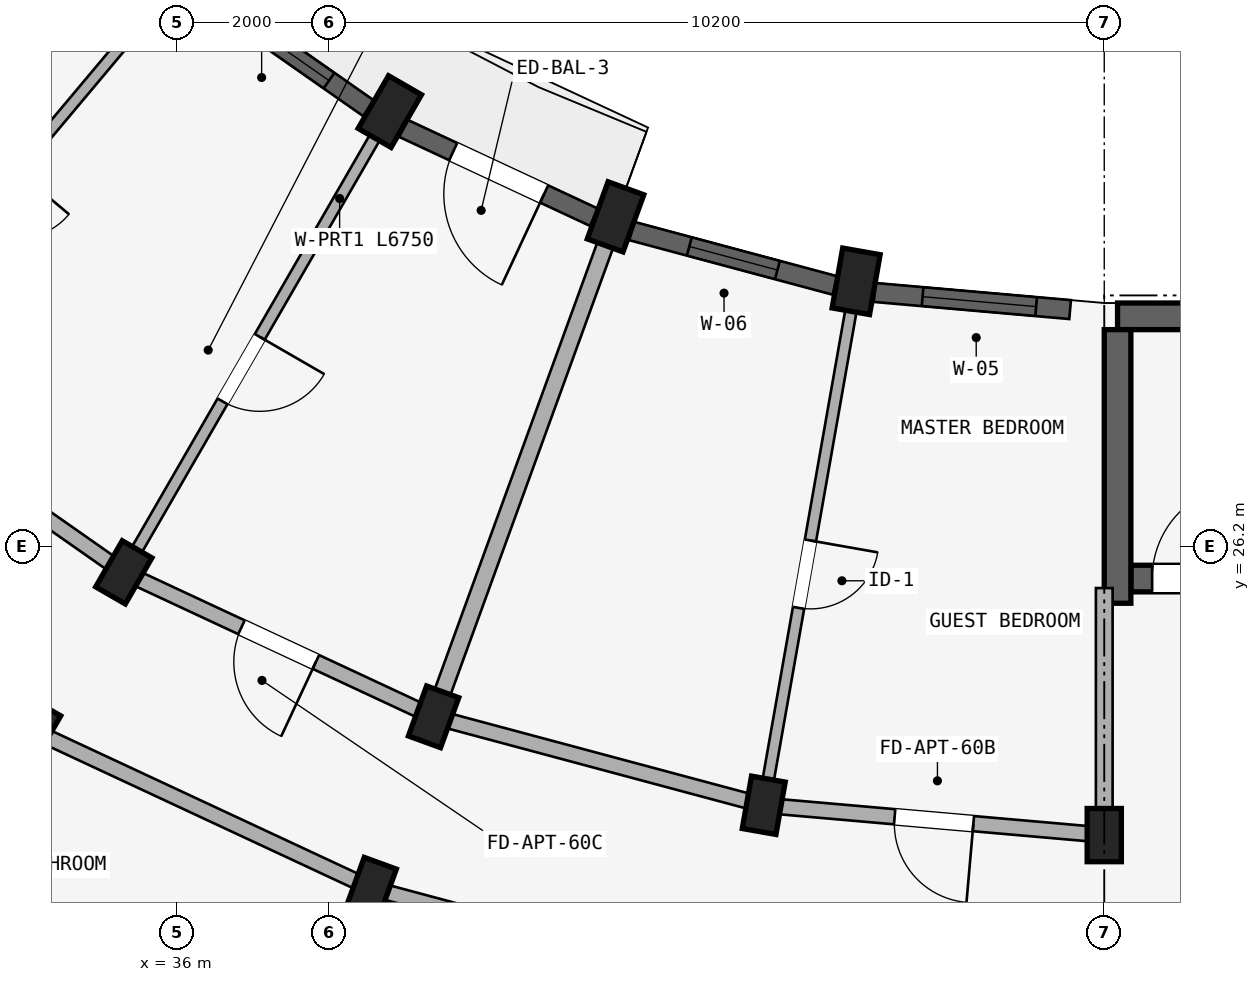
"""IFC4 building model, lengths in metres.
Left out: names, types, materials, properties, quantities, classifications, styles, units other than length and angle.
Written with IfcOpenShell. Run it as: python <this file> out.ifc"""

import sys

from ifc_helpers import new_model, si_unit, direction, frame, frame_2d, origin, origin_2d, place, context, subcontext, project, spatial, rectangle, extrude, element, fill, save


model = new_model("IFC4")
c1 = context("Model", 3, precision=1e-05, world=origin(), true_north=direction((0.0, 1.0)))
c2 = subcontext(c1, "Body", "Model", "MODEL_VIEW")
j1 = project(units=[si_unit("LENGTHUNIT", "METRE"), si_unit("PLANEANGLEUNIT", "RADIAN")], contexts=[c1])
p1 = place(None, origin())
s1 = spatial("IfcSite", under=j1, at=p1, CompositionType="ELEMENT")
p2 = place(p1, origin())
s2 = spatial("IfcBuilding", under=s1, at=p2, CompositionType="ELEMENT")
p3 = place(p2, frame((0.0, 0.0, 24.45)))
s3 = spatial("IfcBuildingStorey", under=s2, at=p3, CompositionType="ELEMENT", Elevation=24.45)
p4 = place(p3, frame((48.375, 29.225, 0.0), z_axis=(0.0, 0.0, 1.0), x_axis=(1.0, 0.0, 0.0)))
e1 = element("IfcWall", 1, at=p4, inside=s3, PredefinedType="SHEAR", context=c2, shape_type="SweptSolid", body=[
    extrude(rectangle(XDim=8.25, YDim=0.35, at=frame_2d((4.125, 0.0))), origin(), (0.0, 0.0, 1.0), 2.93),
])
p5 = place(p3, frame((48.55, 25.775, 0.0), z_axis=(0.0, 0.0, 1.0), x_axis=(1.0, 0.0, 0.0)))
e2 = element("IfcWall", 2, at=p5, inside=s3, PredefinedType="SHEAR", context=c2, shape_type="SweptSolid", body=[
    extrude(rectangle(XDim=7.9, YDim=0.35, at=frame_2d((3.95, 0.0))), origin(), (0.0, 0.0, 1.0), 2.93),
])
p6 = place(p5, frame((0.28, 0.0, 0.0)))
e3 = element("IfcOpeningElement", 3, at=p6, cuts=e2, PredefinedType="OPENING", context=c2, shape_type="SweptSolid", body=[
    extrude(rectangle(XDim=1.24, YDim=2.15, at=frame_2d((0.62, 1.075))), frame((0.0, 0.185, 0.0), z_axis=(0.0, -1.0, 0.0), x_axis=(1.0, 0.0, 0.0)), (0.0, 0.0, 1.0), 0.37),
])
p7 = place(p3, frame((48.375, 29.05, 0.0), z_axis=(0.0, 0.0, 1.0), x_axis=(0.0, -1.0, 0.0)))
e4 = element("IfcWall", 4, at=p7, inside=s3, PredefinedType="SHEAR", context=c2, shape_type="SweptSolid", body=[
    extrude(rectangle(XDim=3.6, YDim=0.35, at=frame_2d((1.8, 0.0))), origin(), (0.0, 0.0, 1.0), 2.93),
])
p8 = place(p3, frame((48.2, 22.4, 0.0), z_axis=(0.0, 0.0, 1.0), x_axis=(1.0, 0.0, 0.0)))
e5 = element("IfcColumn", 5, at=p8, inside=s3, PredefinedType="COLUMN", context=c2, shape_type="SweptSolid", body=[
    extrude(rectangle(XDim=0.45, YDim=0.7, at=origin_2d()), origin(), (0.0, 0.0, 1.0), 2.93),
])
p9 = place(p3, frame((44.935, 29.686, 0.0), z_axis=(0.0, 0.0, 1.0), x_axis=(-0.984807753012, 0.173648177667, 0.0)))
e6 = element("IfcColumn", 6, at=p9, inside=s3, PredefinedType="COLUMN", context=c2, shape_type="SweptSolid", body=[
    extrude(rectangle(XDim=0.5, YDim=0.8, at=origin_2d()), origin(), (0.0, 0.0, 1.0), 2.93),
])
p10 = place(p3, frame((43.72, 22.792, 0.0), z_axis=(0.0, 0.0, 1.0), x_axis=(-0.984807753012, 0.173648177667, 0.0)))
e7 = element("IfcColumn", 7, at=p10, inside=s3, PredefinedType="COLUMN", context=c2, shape_type="SweptSolid", body=[
    extrude(rectangle(XDim=0.45, YDim=0.7, at=origin_2d()), origin(), (0.0, 0.0, 1.0), 2.93),
])
p11 = place(p3, frame((41.77, 30.534, 0.0), z_axis=(0.0, 0.0, 1.0), x_axis=(-0.939692620786, 0.342020143326, 0.0)))
e8 = element("IfcColumn", 8, at=p11, inside=s3, PredefinedType="COLUMN", context=c2, shape_type="SweptSolid", body=[
    extrude(rectangle(XDim=0.5, YDim=0.8, at=origin_2d()), origin(), (0.0, 0.0, 1.0), 2.93),
])
for number, where, z_axis, x_axis in (
    (9, (39.376, 23.956, 0.0), (0.0, 0.0, 1.0), (-0.94, 0.342, 0.0)),
    (10, (38.555, 21.701, 0.0), (0.0, 0.0, 1.0), (-0.94, 0.342, 0.0)),
):
    element("IfcColumn", number, at=place(p3, frame(where, z_axis=z_axis, x_axis=x_axis)), inside=s3, PredefinedType="COLUMN", context=c2, shape_type="SweptSolid", body=[
        extrude(rectangle(XDim=0.45, YDim=0.7, at=origin_2d()), origin(), (0.0, 0.0, 1.0), 2.93),
    ])
p12 = place(p3, frame((38.8, 31.919, 0.0), z_axis=(0.0, 0.0, 1.0), x_axis=(-0.866025403784, 0.5, 0.0)))
e11 = element("IfcColumn", 11, at=p12, inside=s3, PredefinedType="COLUMN", context=c2, shape_type="SweptSolid", body=[
    extrude(rectangle(XDim=0.5, YDim=0.8, at=origin_2d()), origin(), (0.0, 0.0, 1.0), 2.93),
])
for number, where, z_axis, x_axis in (
    (12, (35.3, 25.856, 0.0), (0.0, 0.0, 1.0), (-0.866, 0.5, 0.0)),
    (13, (34.1, 23.778, 0.0), (0.0, 0.0, 1.0), (-0.866, 0.5, 0.0)),
):
    element("IfcColumn", number, at=place(p3, frame(where, z_axis=z_axis, x_axis=x_axis)), inside=s3, PredefinedType="COLUMN", context=c2, shape_type="SweptSolid", body=[
        extrude(rectangle(XDim=0.45, YDim=0.7, at=origin_2d()), origin(), (0.0, 0.0, 1.0), 2.93),
    ])
p13 = place(p3, frame((48.2, 22.4, 0.0), z_axis=(0.0, 0.0, 1.0), x_axis=(-0.996191949488, 0.087187153726, 0.0)))
e14 = element("IfcWall", 14, at=p13, inside=s3, PredefinedType="STANDARD", context=c2, shape_type="SweptSolid", body=[
    extrude(rectangle(XDim=4.497, YDim=0.2, at=frame_2d((2.249, 0.0))), origin(), (0.0, 0.0, 1.0), 2.372),
])
p14 = place(p13, frame((1.729, 0.0, 0.0)))
e15 = element("IfcOpeningElement", 15, at=p14, cuts=e14, PredefinedType="OPENING", context=c2, shape_type="SweptSolid", body=[
    extrude(rectangle(XDim=1.04, YDim=2.15, at=frame_2d((0.52, 1.075))), frame((0.0, 0.11, 0.0), z_axis=(0.0, -1.0, 0.0), x_axis=(1.0, 0.0, 0.0)), (0.0, 0.0, 1.0), 0.22),
])
p15 = place(p3, frame((43.72, 22.792, 0.0), z_axis=(0.0, 0.0, 1.0), x_axis=(-0.965934240054, 0.258787642463, 0.0)))
e16 = element("IfcWall", 16, at=p15, inside=s3, PredefinedType="STANDARD", context=c2, shape_type="SweptSolid", body=[
    extrude(rectangle(XDim=4.497, YDim=0.2, at=frame_2d((2.249, 0.0))), origin(), (0.0, 0.0, 1.0), 2.372),
])
p16 = place(p3, frame((43.303, 20.428, 0.0), z_axis=(0.0, 0.0, 1.0), x_axis=(-0.965930095386, 0.258803112091, 0.0)))
e17 = element("IfcWall", 17, at=p16, inside=s3, PredefinedType="STANDARD", context=c2, shape_type="SweptSolid", body=[
    extrude(rectangle(XDim=4.916, YDim=0.2, at=frame_2d((2.458, 0.0))), origin(), (0.0, 0.0, 1.0), 2.372),
])
p17 = place(p3, frame((39.376, 23.956, 0.0), z_axis=(0.0, 0.0, 1.0), x_axis=(-0.906307919131, 0.422617978463, 0.0)))
e18 = element("IfcWall", 18, at=p17, inside=s3, PredefinedType="STANDARD", context=c2, shape_type="SweptSolid", body=[
    extrude(rectangle(XDim=4.497, YDim=0.2, at=frame_2d((2.249, 0.0))), origin(), (0.0, 0.0, 1.0), 2.372),
])
p18 = place(p17, frame((1.709, 0.0, 0.0)))
e19 = element("IfcOpeningElement", 19, at=p18, cuts=e18, PredefinedType="OPENING", context=c2, shape_type="SweptSolid", body=[
    extrude(rectangle(XDim=1.08, YDim=2.15, at=frame_2d((0.54, 1.075))), frame((0.0, 0.11, 0.0), z_axis=(0.0, -1.0, 0.0), x_axis=(1.0, 0.0, 0.0)), (0.0, 0.0, 1.0), 0.22),
])
p19 = place(p3, frame((38.555, 21.701, 0.0), z_axis=(0.0, 0.0, 1.0), x_axis=(-0.906302381024, 0.422629854778, 0.0)))
e20 = element("IfcWall", 20, at=p19, inside=s3, PredefinedType="STANDARD", context=c2, shape_type="SweptSolid", body=[
    extrude(rectangle(XDim=4.915, YDim=0.2, at=frame_2d((2.458, 0.0))), origin(), (0.0, 0.0, 1.0), 2.372),
])
p20 = place(p3, frame((35.3, 25.856, 0.0), z_axis=(0.0, 0.0, 1.0), x_axis=(-0.819155404658, 0.573571637217, 0.0)))
e21 = element("IfcWall", 21, at=p20, inside=s3, PredefinedType="STANDARD", context=c2, shape_type="SweptSolid", body=[
    extrude(rectangle(XDim=4.497, YDim=0.2, at=frame_2d((2.249, 0.0))), origin(), (0.0, 0.0, 1.0), 2.372),
])
p21 = place(p3, frame((48.2, 25.65, 0.0), z_axis=(0.0, 0.0, 1.0), x_axis=(0.0, -1.0, 0.0)))
e22 = element("IfcWall", 22, at=p21, inside=s3, PredefinedType="STANDARD", context=c2, shape_type="SweptSolid", body=[
    extrude(rectangle(XDim=3.2, YDim=0.22, at=frame_2d((1.6, 0.0))), origin(), (0.0, 0.0, 1.0), 2.372),
])
p22 = place(p3, frame((44.901, 29.489, 0.0), z_axis=(0.0, 0.0, 1.0), x_axis=(-0.173647089161, -0.984807944945, 0.0)))
e23 = element("IfcWall", 23, at=p22, inside=s3, PredefinedType="PARTITIONING", context=c2, shape_type="SweptSolid", body=[
    extrude(rectangle(XDim=6.75, YDim=0.15, at=frame_2d((3.375, 0.0))), origin(), (0.0, 0.0, 1.0), 2.372),
])
p23 = place(p22, frame((3.262, 0.0, 0.0)))
e24 = element("IfcOpeningElement", 24, at=p23, cuts=e23, PredefinedType="OPENING", context=c2, shape_type="SweptSolid", body=[
    extrude(rectangle(XDim=0.9, YDim=2.1, at=frame_2d((0.45, 1.05))), frame((0.0, 0.085, 0.0), z_axis=(0.0, -1.0, 0.0), x_axis=(1.0, 0.0, 0.0)), (0.0, 0.0, 1.0), 0.17),
])
p24 = place(p3, frame((41.702, 30.346, 0.0), z_axis=(0.0, 0.0, 1.0), x_axis=(-0.342010221662, -0.939696231917, 0.0)))
e25 = element("IfcWall", 25, at=p24, inside=s3, PredefinedType="STANDARD", context=c2, shape_type="SweptSolid", body=[
    extrude(rectangle(XDim=6.75, YDim=0.22, at=frame_2d((3.375, 0.0))), origin(), (0.0, 0.0, 1.0), 2.372),
])
p25 = place(p3, frame((38.521, 21.607, 0.0), z_axis=(0.0, 0.0, 1.0), x_axis=(-0.342005081534, -0.939698102693, 0.0)))
e26 = element("IfcWall", 26, at=p25, inside=s3, PredefinedType="PARTITIONING", context=c2, shape_type="SweptSolid", body=[
    extrude(rectangle(XDim=11.82, YDim=0.15, at=frame_2d((5.91, 0.0))), origin(), (0.0, 0.0, 1.0), 2.372),
])
p26 = place(p25, frame((7.5, 0.0, 0.0)))
e27 = element("IfcOpeningElement", 27, at=p26, cuts=e26, PredefinedType="OPENING", context=c2, shape_type="SweptSolid", body=[
    extrude(rectangle(XDim=0.8, YDim=2.1, at=frame_2d((0.4, 1.05))), frame((0.0, 0.085, 0.0), z_axis=(0.0, -1.0, 0.0), x_axis=(1.0, 0.0, 0.0)), (0.0, 0.0, 1.0), 0.17),
])
p27 = place(p3, frame((38.7, 31.746, 0.0), z_axis=(0.0, 0.0, 1.0), x_axis=(-0.499997969693, -0.866026575979, 0.0)))
e28 = element("IfcWall", 28, at=p27, inside=s3, PredefinedType="PARTITIONING", context=c2, shape_type="SweptSolid", body=[
    extrude(rectangle(XDim=6.75, YDim=0.15, at=frame_2d((3.375, 0.0))), origin(), (0.0, 0.0, 1.0), 2.372),
])
p28 = place(p27, frame((3.222, 0.0, 0.0)))
e29 = element("IfcOpeningElement", 29, at=p28, cuts=e28, PredefinedType="OPENING", context=c2, shape_type="SweptSolid", body=[
    extrude(rectangle(XDim=0.98, YDim=2.12, at=frame_2d((0.49, 1.06))), frame((0.0, 0.085, 0.0), z_axis=(0.0, -1.0, 0.0), x_axis=(1.0, 0.0, 0.0)), (0.0, 0.0, 1.0), 0.17),
])
p29 = place(p3, frame((35.987, 33.645, 0.0), z_axis=(0.0, 0.0, 1.0), x_axis=(-0.642784846501, -0.766046761698, 0.0)))
e30 = element("IfcWall", 30, at=p29, inside=s3, PredefinedType="PARTITIONING", context=c2, shape_type="SweptSolid", body=[
    extrude(rectangle(XDim=6.75, YDim=0.15, at=frame_2d((3.375, 0.0))), origin(), (0.0, 0.0, 1.0), 2.372),
])
p30 = place(p29, frame((3.262, 0.0, 0.0)))
e31 = element("IfcOpeningElement", 31, at=p30, cuts=e30, PredefinedType="OPENING", context=c2, shape_type="SweptSolid", body=[
    extrude(rectangle(XDim=0.9, YDim=2.1, at=frame_2d((0.45, 1.05))), frame((0.0, 0.085, 0.0), z_axis=(0.0, -1.0, 0.0), x_axis=(1.0, 0.0, 0.0)), (0.0, 0.0, 1.0), 0.17),
])
p31 = place(p3, frame((47.751, 29.314, 0.0), z_axis=(0.0, 0.0, 1.0), x_axis=(-0.996188278786, 0.087229084652, 0.0)))
e32 = element("IfcWall", 32, at=p31, inside=s3, PredefinedType="STANDARD", context=c2, shape_type="SweptSolid", body=[
    extrude(rectangle(XDim=2.583, YDim=0.25, at=frame_2d((1.292, 0.0))), origin(), (0.0, 0.0, 1.0), 2.422),
])
p32 = place(p31, frame((0.448, 0.0, 0.572)))
e33 = element("IfcOpeningElement", 33, at=p32, cuts=e32, PredefinedType="OPENING", context=c2, shape_type="SweptSolid", body=[
    extrude(rectangle(XDim=1.5, YDim=1.65, at=frame_2d((0.75, 0.825))), frame((0.0, 0.135, 0.0), z_axis=(0.0, -1.0, 0.0), x_axis=(1.0, 0.0, 0.0)), (0.0, 0.0, 1.0), 0.27),
])
p33 = place(p3, frame((44.658, 29.631, 0.0), z_axis=(0.0, 0.0, 1.0), x_axis=(-0.965935855992, 0.25878161084, 0.0)))
e34 = element("IfcWall", 34, at=p33, inside=s3, PredefinedType="STANDARD", context=c2, shape_type="SweptSolid", body=[
    extrude(rectangle(XDim=2.77, YDim=0.25, at=frame_2d((1.385, 0.0))), origin(), (0.0, 0.0, 1.0), 2.422),
])
p34 = place(p33, frame((0.785, 0.0, 0.722)))
e35 = element("IfcOpeningElement", 35, at=p34, cuts=e34, PredefinedType="OPENING", context=c2, shape_type="SweptSolid", body=[
    extrude(rectangle(XDim=1.2, YDim=1.5, at=frame_2d((0.6, 0.75))), frame((0.0, 0.135, 0.0), z_axis=(0.0, -1.0, 0.0), x_axis=(1.0, 0.0, 0.0)), (0.0, 0.0, 1.0), 0.27),
])
p35 = place(p3, frame((41.487, 30.528, 0.0), z_axis=(0.0, 0.0, 1.0), x_axis=(-0.906293449611, 0.422649007088, 0.0)))
e36 = element("IfcWall", 36, at=p35, inside=s3, PredefinedType="STANDARD", context=c2, shape_type="SweptSolid", body=[
    extrude(rectangle(XDim=2.77, YDim=0.25, at=frame_2d((1.385, 0.0))), origin(), (0.0, 0.0, 1.0), 2.422),
])
p36 = place(p35, frame((0.725, 0.0, 0.0)))
e37 = element("IfcOpeningElement", 37, at=p36, cuts=e36, PredefinedType="OPENING", context=c2, shape_type="SweptSolid", body=[
    extrude(rectangle(XDim=1.32, YDim=2.15, at=frame_2d((0.66, 1.075))), frame((0.0, 0.135, 0.0), z_axis=(0.0, -1.0, 0.0), x_axis=(1.0, 0.0, 0.0)), (0.0, 0.0, 1.0), 0.27),
])
p37 = place(p3, frame((38.521, 31.962, 0.0), z_axis=(0.0, 0.0, 1.0), x_axis=(-0.819111815273, 0.573633885053, 0.0)))
e38 = element("IfcWall", 38, at=p37, inside=s3, PredefinedType="STANDARD", context=c2, shape_type="SweptSolid", body=[
    extrude(rectangle(XDim=2.77, YDim=0.25, at=frame_2d((1.385, 0.0))), origin(), (0.0, 0.0, 1.0), 2.422),
])
p38 = place(p37, frame((0.635, 0.0, 0.572)))
e39 = element("IfcOpeningElement", 39, at=p38, cuts=e38, PredefinedType="OPENING", context=c2, shape_type="SweptSolid", body=[
    extrude(rectangle(XDim=1.5, YDim=1.65, at=frame_2d((0.75, 0.825))), frame((0.0, 0.135, 0.0), z_axis=(0.0, -1.0, 0.0), x_axis=(1.0, 0.0, 0.0)), (0.0, 0.0, 1.0), 0.27),
])
p39 = place(p32, origin())
e40 = element("IfcWindow", 40, at=p39, inside=s3, PartitioningType="DOUBLE_PANEL_VERTICAL", PredefinedType="WINDOW", context=c2, shape_type="SweptSolid", body=[
    extrude(rectangle(XDim=1.5, YDim=1.65, at=frame_2d((0.75, 0.825))), frame((0.0, 0.03, 0.0), z_axis=(0.0, -1.0, 0.0), x_axis=(1.0, 0.0, 0.0)), (0.0, 0.0, 1.0), 0.06),
])
fill(e33, e40)
p40 = place(p34, origin())
e41 = element("IfcWindow", 41, at=p40, inside=s3, PartitioningType="SINGLE_PANEL", PredefinedType="WINDOW", context=c2, shape_type="SweptSolid", body=[
    extrude(rectangle(XDim=1.2, YDim=1.5, at=frame_2d((0.6, 0.75))), frame((0.0, 0.03, 0.0), z_axis=(0.0, -1.0, 0.0), x_axis=(1.0, 0.0, 0.0)), (0.0, 0.0, 1.0), 0.06),
])
fill(e35, e41)
p41 = place(p38, origin())
e42 = element("IfcWindow", 42, at=p41, inside=s3, PartitioningType="DOUBLE_PANEL_VERTICAL", PredefinedType="WINDOW", context=c2, shape_type="SweptSolid", body=[
    extrude(rectangle(XDim=1.5, YDim=1.65, at=frame_2d((0.75, 0.825))), frame((0.0, 0.03, 0.0), z_axis=(0.0, -1.0, 0.0), x_axis=(1.0, 0.0, 0.0)), (0.0, 0.0, 1.0), 0.06),
])
fill(e39, e42)
p42 = place(p6, origin())
e43 = element("IfcDoor", 43, at=p42, inside=s3, OperationType="SINGLE_SWING_RIGHT", PredefinedType="DOOR", context=c2, shape_type="SweptSolid", body=[
    extrude(rectangle(XDim=1.24, YDim=2.15, at=frame_2d((0.62, 1.075))), frame((0.0, 0.025, 0.0), z_axis=(0.0, -1.0, 0.0), x_axis=(1.0, 0.0, 0.0)), (0.0, 0.0, 1.0), 0.05),
])
fill(e3, e43)
p43 = place(p23, frame((0.9, 0.0, 0.0), z_axis=(0.0, 0.0, 1.0), x_axis=(-1.0, 0.0, 0.0)))
e44 = element("IfcDoor", 44, at=p43, inside=s3, OperationType="SINGLE_SWING_RIGHT", PredefinedType="DOOR", context=c2, shape_type="SweptSolid", body=[
    extrude(rectangle(XDim=0.9, YDim=2.1, at=frame_2d((0.45, 1.05))), frame((0.0, 0.025, 0.0), z_axis=(0.0, -1.0, 0.0), x_axis=(1.0, 0.0, 0.0)), (0.0, 0.0, 1.0), 0.05),
])
fill(e24, e44)
p44 = place(p28, origin())
e45 = element("IfcDoor", 45, at=p44, inside=s3, OperationType="SINGLE_SWING_LEFT", PredefinedType="DOOR", context=c2, shape_type="SweptSolid", body=[
    extrude(rectangle(XDim=0.98, YDim=2.12, at=frame_2d((0.49, 1.06))), frame((0.0, 0.025, 0.0), z_axis=(0.0, -1.0, 0.0), x_axis=(1.0, 0.0, 0.0)), (0.0, 0.0, 1.0), 0.05),
])
fill(e29, e45)
p45 = place(p14, origin())
e46 = element("IfcDoor", 46, at=p45, inside=s3, OperationType="SINGLE_SWING_LEFT", PredefinedType="DOOR", context=c2, shape_type="SweptSolid", body=[
    extrude(rectangle(XDim=1.04, YDim=2.15, at=frame_2d((0.52, 1.075))), frame((0.0, 0.025, 0.0), z_axis=(0.0, -1.0, 0.0), x_axis=(1.0, 0.0, 0.0)), (0.0, 0.0, 1.0), 0.05),
])
fill(e15, e46)
p46 = place(p18, frame((1.08, 0.0, 0.0), z_axis=(0.0, 0.0, 1.0), x_axis=(-1.0, 0.0, 0.0)))
e47 = element("IfcDoor", 47, at=p46, inside=s3, OperationType="SINGLE_SWING_RIGHT", PredefinedType="DOOR", context=c2, shape_type="SweptSolid", body=[
    extrude(rectangle(XDim=1.08, YDim=2.15, at=frame_2d((0.54, 1.075))), frame((0.0, 0.025, 0.0), z_axis=(0.0, -1.0, 0.0), x_axis=(1.0, 0.0, 0.0)), (0.0, 0.0, 1.0), 0.05),
])
fill(e19, e47)
p47 = place(p36, frame((1.32, 0.0, 0.0), z_axis=(0.0, 0.0, 1.0), x_axis=(-1.0, 0.0, 0.0)))
e48 = element("IfcDoor", 48, at=p47, inside=s3, OperationType="SINGLE_SWING_RIGHT", PredefinedType="DOOR", context=c2, shape_type="SweptSolid", body=[
    extrude(rectangle(XDim=1.32, YDim=2.15, at=frame_2d((0.66, 1.075))), frame((0.0, 0.025, 0.0), z_axis=(0.0, -1.0, 0.0), x_axis=(1.0, 0.0, 0.0)), (0.0, 0.0, 1.0), 0.05),
])
fill(e37, e48)
save(model, sys.argv[1])
